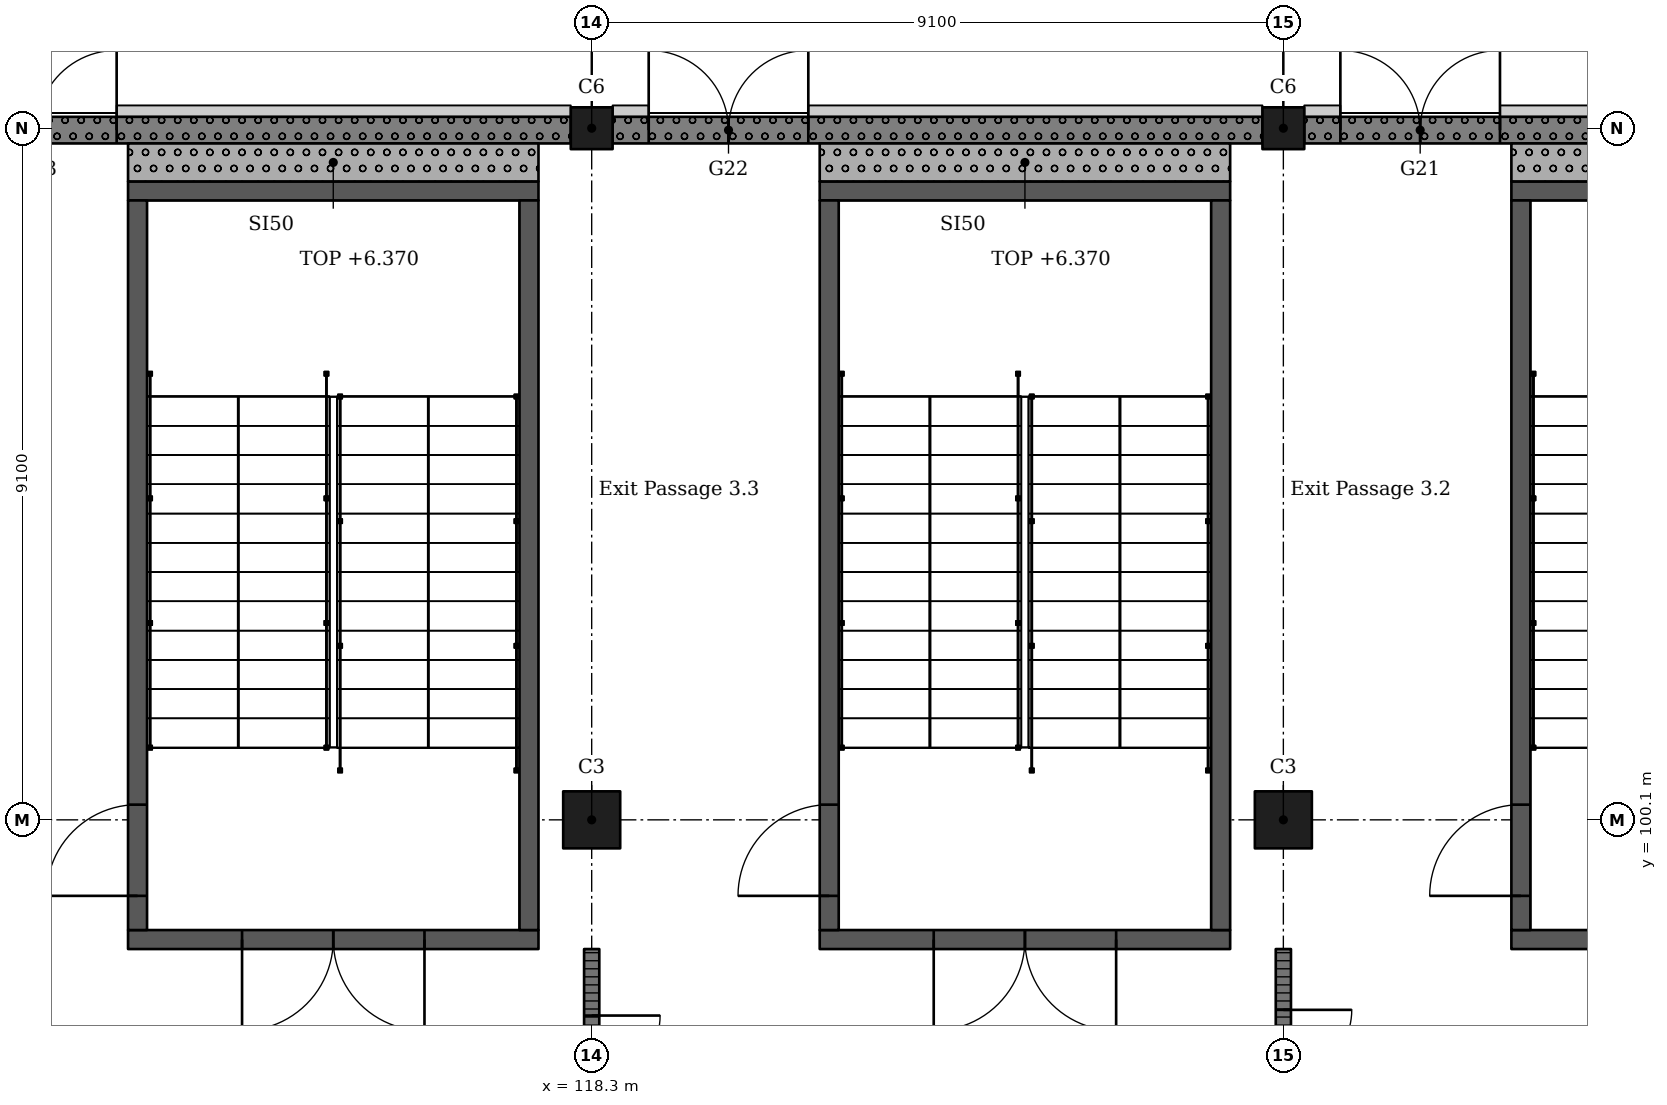
"""IFC4 building model, lengths in metres.
Left out: names, types, materials, properties, quantities, classifications, styles, units other than length and angle.
Written with IfcOpenShell. Run it as: python <this file> out.ifc"""

import sys

from ifc_helpers import new_model, si_unit, direction, frame, frame_2d, origin, origin_2d, place, context, subcontext, project, spatial, rectangle, extrude, element, fill, save


model = new_model("IFC4")
c1 = context("Model", 3, precision=1e-05, world=origin(), true_north=direction((0.0, 1.0)))
c2 = subcontext(c1, "Body", "Model", "MODEL_VIEW")
j1 = project(units=[si_unit("LENGTHUNIT", "METRE"), si_unit("PLANEANGLEUNIT", "RADIAN")], contexts=[c1])
p1 = place(None, origin())
s1 = spatial("IfcSite", under=j1, at=p1, CompositionType="ELEMENT")
p2 = place(p1, origin())
s2 = spatial("IfcBuilding", under=s1, at=p2, CompositionType="ELEMENT")
p3 = place(p2, origin())
s3 = spatial("IfcBuildingStorey", under=s2, at=p3, CompositionType="ELEMENT", Elevation=0.0)
p4 = place(p3, frame((118.3, 100.1, -0.4), z_axis=(0.0, 0.0, 1.0), x_axis=(1.0, 0.0, 0.0)))
e1 = element("IfcColumn", 1, at=p4, inside=s3, PredefinedType="COLUMN", context=c2, shape_type="SweptSolid", body=[
    extrude(rectangle(XDim=0.75, YDim=0.75, at=origin_2d()), origin(), (0.0, 0.0, 1.0), 6.77),
])
p5 = place(p3, frame((118.3, 109.2, -0.4), z_axis=(0.0, 0.0, 1.0), x_axis=(1.0, 0.0, 0.0)))
e2 = element("IfcColumn", 2, at=p5, inside=s3, PredefinedType="COLUMN", context=c2, shape_type="SweptSolid", body=[
    extrude(rectangle(XDim=0.55, YDim=0.55, at=origin_2d()), origin(), (0.0, 0.0, 1.0), 6.77),
])
p6 = place(p3, frame((127.4, 100.1, -0.4), z_axis=(0.0, 0.0, 1.0), x_axis=(1.0, 0.0, 0.0)))
e3 = element("IfcColumn", 3, at=p6, inside=s3, PredefinedType="COLUMN", context=c2, shape_type="SweptSolid", body=[
    extrude(rectangle(XDim=0.75, YDim=0.75, at=origin_2d()), origin(), (0.0, 0.0, 1.0), 6.77),
])
p7 = place(p3, frame((127.4, 109.2, -0.4), z_axis=(0.0, 0.0, 1.0), x_axis=(1.0, 0.0, 0.0)))
e4 = element("IfcColumn", 4, at=p7, inside=s3, PredefinedType="COLUMN", context=c2, shape_type="SweptSolid", body=[
    extrude(rectangle(XDim=0.55, YDim=0.55, at=origin_2d()), origin(), (0.0, 0.0, 1.0), 6.77),
])
p8 = place(p3, frame((135.8, 98.525, -0.4), z_axis=(0.0, 0.0, 1.0), x_axis=(-1.0, 0.0, 0.0)))
e5 = element("IfcWall", 5, at=p8, inside=s3, PredefinedType="SHEAR", context=c2, shape_type="SweptSolid", body=[
    extrude(rectangle(XDim=5.4, YDim=0.25, at=frame_2d((2.7, 0.0))), origin(), (0.0, 0.0, 1.0), 6.77),
])
p9 = place(p8, frame((1.5, 0.0, 0.4)))
e6 = element("IfcOpeningElement", 6, at=p9, cuts=e5, PredefinedType="OPENING", context=c2, shape_type="SweptSolid", body=[
    extrude(rectangle(XDim=2.4, YDim=2.1, at=frame_2d((1.2, 1.05))), frame((0.0, 0.135, 0.0), z_axis=(0.0, -1.0, 0.0), x_axis=(1.0, 0.0, 0.0)), (0.0, 0.0, 1.0), 0.27),
])
p10 = place(p3, frame((135.8, 108.375, -0.4), z_axis=(0.0, 0.0, 1.0), x_axis=(-1.0, 0.0, 0.0)))
e7 = element("IfcWall", 7, at=p10, inside=s3, PredefinedType="SHEAR", context=c2, shape_type="SweptSolid", body=[
    extrude(rectangle(XDim=5.4, YDim=0.25, at=frame_2d((2.7, 0.0))), origin(), (0.0, 0.0, 1.0), 6.77),
])
p11 = place(p3, frame((130.525, 108.25, -0.4), z_axis=(0.0, 0.0, 1.0), x_axis=(0.0, -1.0, 0.0)))
e8 = element("IfcWall", 8, at=p11, inside=s3, PredefinedType="SHEAR", context=c2, shape_type="SweptSolid", body=[
    extrude(rectangle(XDim=9.6, YDim=0.25, at=frame_2d((4.8, 0.0))), origin(), (0.0, 0.0, 1.0), 6.77),
])
p12 = place(p11, frame((7.95, 0.0, 0.4)))
e9 = element("IfcOpeningElement", 9, at=p12, cuts=e8, PredefinedType="OPENING", context=c2, shape_type="SweptSolid", body=[
    extrude(rectangle(XDim=1.2, YDim=2.1, at=frame_2d((0.6, 1.05))), frame((0.0, 0.135, 0.0), z_axis=(0.0, -1.0, 0.0), x_axis=(1.0, 0.0, 0.0)), (0.0, 0.0, 1.0), 0.27),
])
p13 = place(p3, frame((126.7, 98.525, -0.4), z_axis=(0.0, 0.0, 1.0), x_axis=(-1.0, 0.0, 0.0)))
e10 = element("IfcWall", 10, at=p13, inside=s3, PredefinedType="SHEAR", context=c2, shape_type="SweptSolid", body=[
    extrude(rectangle(XDim=5.4, YDim=0.25, at=frame_2d((2.7, 0.0))), origin(), (0.0, 0.0, 1.0), 6.77),
])
p14 = place(p13, frame((1.5, 0.0, 0.4)))
e11 = element("IfcOpeningElement", 11, at=p14, cuts=e10, PredefinedType="OPENING", context=c2, shape_type="SweptSolid", body=[
    extrude(rectangle(XDim=2.4, YDim=2.1, at=frame_2d((1.2, 1.05))), frame((0.0, 0.135, 0.0), z_axis=(0.0, -1.0, 0.0), x_axis=(1.0, 0.0, 0.0)), (0.0, 0.0, 1.0), 0.27),
])
p15 = place(p3, frame((126.7, 108.375, -0.4), z_axis=(0.0, 0.0, 1.0), x_axis=(-1.0, 0.0, 0.0)))
e12 = element("IfcWall", 12, at=p15, inside=s3, PredefinedType="SHEAR", context=c2, shape_type="SweptSolid", body=[
    extrude(rectangle(XDim=5.4, YDim=0.25, at=frame_2d((2.7, 0.0))), origin(), (0.0, 0.0, 1.0), 6.77),
])
p16 = place(p3, frame((121.425, 108.25, -0.4), z_axis=(0.0, 0.0, 1.0), x_axis=(0.0, -1.0, 0.0)))
e13 = element("IfcWall", 13, at=p16, inside=s3, PredefinedType="SHEAR", context=c2, shape_type="SweptSolid", body=[
    extrude(rectangle(XDim=9.6, YDim=0.25, at=frame_2d((4.8, 0.0))), origin(), (0.0, 0.0, 1.0), 6.77),
])
p17 = place(p16, frame((7.95, 0.0, 0.4)))
e14 = element("IfcOpeningElement", 14, at=p17, cuts=e13, PredefinedType="OPENING", context=c2, shape_type="SweptSolid", body=[
    extrude(rectangle(XDim=1.2, YDim=2.1, at=frame_2d((0.6, 1.05))), frame((0.0, 0.135, 0.0), z_axis=(0.0, -1.0, 0.0), x_axis=(1.0, 0.0, 0.0)), (0.0, 0.0, 1.0), 0.27),
])
p18 = place(p3, frame((126.575, 108.25, -0.4), z_axis=(0.0, 0.0, 1.0), x_axis=(0.0, -1.0, 0.0)))
e15 = element("IfcWall", 15, at=p18, inside=s3, PredefinedType="SHEAR", context=c2, shape_type="SweptSolid", body=[
    extrude(rectangle(XDim=9.6, YDim=0.25, at=frame_2d((4.8, 0.0))), origin(), (0.0, 0.0, 1.0), 6.77),
])
p19 = place(p3, frame((117.6, 98.525, -0.4), z_axis=(0.0, 0.0, 1.0), x_axis=(-1.0, 0.0, 0.0)))
e16 = element("IfcWall", 16, at=p19, inside=s3, PredefinedType="SHEAR", context=c2, shape_type="SweptSolid", body=[
    extrude(rectangle(XDim=5.4, YDim=0.25, at=frame_2d((2.7, 0.0))), origin(), (0.0, 0.0, 1.0), 6.77),
])
p20 = place(p19, frame((1.5, 0.0, 0.4)))
e17 = element("IfcOpeningElement", 17, at=p20, cuts=e16, PredefinedType="OPENING", context=c2, shape_type="SweptSolid", body=[
    extrude(rectangle(XDim=2.4, YDim=2.1, at=frame_2d((1.2, 1.05))), frame((0.0, 0.135, 0.0), z_axis=(0.0, -1.0, 0.0), x_axis=(1.0, 0.0, 0.0)), (0.0, 0.0, 1.0), 0.27),
])
p21 = place(p3, frame((117.6, 108.375, -0.4), z_axis=(0.0, 0.0, 1.0), x_axis=(-1.0, 0.0, 0.0)))
e18 = element("IfcWall", 18, at=p21, inside=s3, PredefinedType="SHEAR", context=c2, shape_type="SweptSolid", body=[
    extrude(rectangle(XDim=5.4, YDim=0.25, at=frame_2d((2.7, 0.0))), origin(), (0.0, 0.0, 1.0), 6.77),
])
p22 = place(p3, frame((112.325, 108.25, -0.4), z_axis=(0.0, 0.0, 1.0), x_axis=(0.0, -1.0, 0.0)))
e19 = element("IfcWall", 19, at=p22, inside=s3, PredefinedType="SHEAR", context=c2, shape_type="SweptSolid", body=[
    extrude(rectangle(XDim=9.6, YDim=0.25, at=frame_2d((4.8, 0.0))), origin(), (0.0, 0.0, 1.0), 6.77),
])
p23 = place(p22, frame((7.95, 0.0, 0.4)))
e20 = element("IfcOpeningElement", 20, at=p23, cuts=e19, PredefinedType="OPENING", context=c2, shape_type="SweptSolid", body=[
    extrude(rectangle(XDim=1.2, YDim=2.1, at=frame_2d((0.6, 1.05))), frame((0.0, 0.135, 0.0), z_axis=(0.0, -1.0, 0.0), x_axis=(1.0, 0.0, 0.0)), (0.0, 0.0, 1.0), 0.27),
])
p24 = place(p3, frame((117.475, 108.25, -0.4), z_axis=(0.0, 0.0, 1.0), x_axis=(0.0, -1.0, 0.0)))
e21 = element("IfcWall", 21, at=p24, inside=s3, PredefinedType="SHEAR", context=c2, shape_type="SweptSolid", body=[
    extrude(rectangle(XDim=9.6, YDim=0.25, at=frame_2d((4.8, 0.0))), origin(), (0.0, 0.0, 1.0), 6.77),
])
p25 = place(p3, frame((136.225, 109.175, 0.0), z_axis=(0.0, 0.0, 1.0), x_axis=(-1.0, 0.0, 0.0)))
e22 = element("IfcWall", 22, at=p25, inside=s3, PredefinedType="SOLIDWALL", context=c2, shape_type="SweptSolid", body=[
    extrude(rectangle(XDim=8.55, YDim=0.35, at=frame_2d((4.275, 0.0))), origin(), (0.0, 0.0, 1.0), 5.27),
])
p26 = place(p25, frame((5.975, 0.0, 0.0)))
e23 = element("IfcOpeningElement", 23, at=p26, cuts=e22, PredefinedType="OPENING", context=c2, shape_type="SweptSolid", body=[
    extrude(rectangle(XDim=2.1, YDim=2.4, at=frame_2d((1.05, 1.2))), frame((0.0, 0.185, 0.0), z_axis=(0.0, -1.0, 0.0), x_axis=(1.0, 0.0, 0.0)), (0.0, 0.0, 1.0), 0.37),
])
p27 = place(p3, frame((127.125, 109.175, 0.0), z_axis=(0.0, 0.0, 1.0), x_axis=(-1.0, 0.0, 0.0)))
e24 = element("IfcWall", 24, at=p27, inside=s3, PredefinedType="SOLIDWALL", context=c2, shape_type="SweptSolid", body=[
    extrude(rectangle(XDim=8.55, YDim=0.35, at=frame_2d((4.275, 0.0))), origin(), (0.0, 0.0, 1.0), 5.27),
])
p28 = place(p27, frame((5.975, 0.0, 0.0)))
e25 = element("IfcOpeningElement", 25, at=p28, cuts=e24, PredefinedType="OPENING", context=c2, shape_type="SweptSolid", body=[
    extrude(rectangle(XDim=2.1, YDim=2.4, at=frame_2d((1.05, 1.2))), frame((0.0, 0.185, 0.0), z_axis=(0.0, -1.0, 0.0), x_axis=(1.0, 0.0, 0.0)), (0.0, 0.0, 1.0), 0.37),
])
p29 = place(p3, frame((118.025, 109.175, 0.0), z_axis=(0.0, 0.0, 1.0), x_axis=(-1.0, 0.0, 0.0)))
e26 = element("IfcWall", 26, at=p29, inside=s3, PredefinedType="SOLIDWALL", context=c2, shape_type="SweptSolid", body=[
    extrude(rectangle(XDim=8.5, YDim=0.35, at=frame_2d((4.25, 0.0))), origin(), (0.0, 0.0, 1.0), 5.27),
])
p30 = place(p29, frame((5.975, 0.0, 0.0)))
e27 = element("IfcOpeningElement", 27, at=p30, cuts=e26, PredefinedType="OPENING", context=c2, shape_type="SweptSolid", body=[
    extrude(rectangle(XDim=2.1, YDim=2.4, at=frame_2d((1.05, 1.2))), frame((0.0, 0.185, 0.0), z_axis=(0.0, -1.0, 0.0), x_axis=(1.0, 0.0, 0.0)), (0.0, 0.0, 1.0), 0.37),
])
p31 = place(p3, frame((130.4, 108.75, 0.0), z_axis=(0.0, 0.0, 1.0), x_axis=(1.0, 0.0, 0.0)))
e28 = element("IfcWall", 28, at=p31, inside=s3, PredefinedType="SOLIDWALL", context=c2, shape_type="SweptSolid", body=[
    extrude(rectangle(XDim=5.4, YDim=0.5, at=frame_2d((2.7, 0.0))), origin(), (0.0, 0.0, 1.0), 6.37),
])
p32 = place(p3, frame((121.3, 108.75, 0.0), z_axis=(0.0, 0.0, 1.0), x_axis=(1.0, 0.0, 0.0)))
e29 = element("IfcWall", 29, at=p32, inside=s3, PredefinedType="SOLIDWALL", context=c2, shape_type="SweptSolid", body=[
    extrude(rectangle(XDim=5.4, YDim=0.5, at=frame_2d((2.7, 0.0))), origin(), (0.0, 0.0, 1.0), 6.37),
])
p33 = place(p3, frame((112.2, 108.75, 0.0), z_axis=(0.0, 0.0, 1.0), x_axis=(1.0, 0.0, 0.0)))
e30 = element("IfcWall", 30, at=p33, inside=s3, PredefinedType="SOLIDWALL", context=c2, shape_type="SweptSolid", body=[
    extrude(rectangle(XDim=5.4, YDim=0.5, at=frame_2d((2.7, 0.0))), origin(), (0.0, 0.0, 1.0), 6.37),
])
p34 = place(p3, frame((118.3, 91.475, 0.0), z_axis=(0.0, 0.0, 1.0), x_axis=(0.0, 1.0, 0.0)))
e31 = element("IfcWall", 31, at=p34, inside=s3, PredefinedType="PARTITIONING", context=c2, shape_type="SweptSolid", body=[
    extrude(rectangle(XDim=6.925, YDim=0.2, at=frame_2d((3.462, 0.0))), origin(), (0.0, 0.0, 1.0), 5.32),
])
p35 = place(p34, frame((0.85, 0.0, 0.0)))
e32 = element("IfcOpeningElement", 32, at=p35, cuts=e31, PredefinedType="OPENING", context=c2, shape_type="SweptSolid", body=[
    extrude(rectangle(XDim=1.8, YDim=2.4, at=frame_2d((0.9, 1.2))), frame((0.0, 0.11, 0.0), z_axis=(0.0, -1.0, 0.0), x_axis=(1.0, 0.0, 0.0)), (0.0, 0.0, 1.0), 0.22),
])
p36 = place(p34, frame((4.25, 0.0, 0.0)))
e33 = element("IfcOpeningElement", 33, at=p36, cuts=e31, PredefinedType="OPENING", context=c2, shape_type="SweptSolid", body=[
    extrude(rectangle(XDim=1.8, YDim=2.4, at=frame_2d((0.9, 1.2))), frame((0.0, 0.11, 0.0), z_axis=(0.0, -1.0, 0.0), x_axis=(1.0, 0.0, 0.0)), (0.0, 0.0, 1.0), 0.22),
])
p37 = place(p3, frame((127.4, 91.45, 0.0), z_axis=(0.0, 0.0, 1.0), x_axis=(0.0, 1.0, 0.0)))
e34 = element("IfcWall", 34, at=p37, inside=s3, PredefinedType="PARTITIONING", context=c2, shape_type="SweptSolid", body=[
    extrude(rectangle(XDim=6.95, YDim=0.2, at=frame_2d((3.475, 0.0))), origin(), (0.0, 0.0, 1.0), 5.32),
])
p38 = place(p37, frame((0.85, 0.0, 0.0)))
e35 = element("IfcOpeningElement", 35, at=p38, cuts=e34, PredefinedType="OPENING", context=c2, shape_type="SweptSolid", body=[
    extrude(rectangle(XDim=1.8, YDim=2.4, at=frame_2d((0.9, 1.2))), frame((0.0, 0.11, 0.0), z_axis=(0.0, -1.0, 0.0), x_axis=(1.0, 0.0, 0.0)), (0.0, 0.0, 1.0), 0.22),
])
p39 = place(p37, frame((4.35, 0.0, 0.0)))
e36 = element("IfcOpeningElement", 36, at=p39, cuts=e34, PredefinedType="OPENING", context=c2, shape_type="SweptSolid", body=[
    extrude(rectangle(XDim=1.8, YDim=2.4, at=frame_2d((0.9, 1.2))), frame((0.0, 0.11, 0.0), z_axis=(0.0, -1.0, 0.0), x_axis=(1.0, 0.0, 0.0)), (0.0, 0.0, 1.0), 0.22),
])
p40 = place(p26, frame((2.1, 0.0, 0.0), z_axis=(0.0, 0.0, 1.0), x_axis=(-1.0, 0.0, 0.0)))
e37 = element("IfcDoor", 37, at=p40, inside=s3, OperationType="DOUBLE_DOOR_SINGLE_SWING", PredefinedType="DOOR", context=c2, shape_type="SweptSolid", body=[
    extrude(rectangle(XDim=2.1, YDim=2.4, at=frame_2d((1.05, 1.2))), frame((0.0, 0.025, 0.0), z_axis=(0.0, -1.0, 0.0), x_axis=(1.0, 0.0, 0.0)), (0.0, 0.0, 1.0), 0.05),
])
fill(e23, e37)
p41 = place(p28, frame((2.1, 0.0, 0.0), z_axis=(0.0, 0.0, 1.0), x_axis=(-1.0, 0.0, 0.0)))
e38 = element("IfcDoor", 38, at=p41, inside=s3, OperationType="DOUBLE_DOOR_SINGLE_SWING", PredefinedType="DOOR", context=c2, shape_type="SweptSolid", body=[
    extrude(rectangle(XDim=2.1, YDim=2.4, at=frame_2d((1.05, 1.2))), frame((0.0, 0.025, 0.0), z_axis=(0.0, -1.0, 0.0), x_axis=(1.0, 0.0, 0.0)), (0.0, 0.0, 1.0), 0.05),
])
fill(e25, e38)
p42 = place(p30, frame((2.1, 0.0, 0.0), z_axis=(0.0, 0.0, 1.0), x_axis=(-1.0, 0.0, 0.0)))
e39 = element("IfcDoor", 39, at=p42, inside=s3, OperationType="DOUBLE_DOOR_SINGLE_SWING", PredefinedType="DOOR", context=c2, shape_type="SweptSolid", body=[
    extrude(rectangle(XDim=2.1, YDim=2.4, at=frame_2d((1.05, 1.2))), frame((0.0, 0.025, 0.0), z_axis=(0.0, -1.0, 0.0), x_axis=(1.0, 0.0, 0.0)), (0.0, 0.0, 1.0), 0.05),
])
fill(e27, e39)
p43 = place(p39, origin())
e40 = element("IfcDoor", 40, at=p43, inside=s3, OperationType="DOUBLE_DOOR_SINGLE_SWING", PredefinedType="DOOR", context=c2, shape_type="SweptSolid", body=[
    extrude(rectangle(XDim=1.8, YDim=2.4, at=frame_2d((0.9, 1.2))), frame((0.0, 0.025, 0.0), z_axis=(0.0, -1.0, 0.0), x_axis=(1.0, 0.0, 0.0)), (0.0, 0.0, 1.0), 0.05),
])
fill(e36, e40)
p44 = place(p36, origin())
e41 = element("IfcDoor", 41, at=p44, inside=s3, OperationType="DOUBLE_DOOR_SINGLE_SWING", PredefinedType="DOOR", context=c2, shape_type="SweptSolid", body=[
    extrude(rectangle(XDim=1.8, YDim=2.4, at=frame_2d((0.9, 1.2))), frame((0.0, 0.025, 0.0), z_axis=(0.0, -1.0, 0.0), x_axis=(1.0, 0.0, 0.0)), (0.0, 0.0, 1.0), 0.05),
])
fill(e33, e41)
p45 = place(p14, origin())
e42 = element("IfcDoor", 42, at=p45, inside=s3, OperationType="DOUBLE_DOOR_SINGLE_SWING", PredefinedType="DOOR", context=c2, shape_type="SweptSolid", body=[
    extrude(rectangle(XDim=2.4, YDim=2.1, at=frame_2d((1.2, 1.05))), frame((0.0, 0.025, 0.0), z_axis=(0.0, -1.0, 0.0), x_axis=(1.0, 0.0, 0.0)), (0.0, 0.0, 1.0), 0.05),
])
fill(e11, e42)
p46 = place(p20, origin())
e43 = element("IfcDoor", 43, at=p46, inside=s3, OperationType="DOUBLE_DOOR_SINGLE_SWING", PredefinedType="DOOR", context=c2, shape_type="SweptSolid", body=[
    extrude(rectangle(XDim=2.4, YDim=2.1, at=frame_2d((1.2, 1.05))), frame((0.0, 0.025, 0.0), z_axis=(0.0, -1.0, 0.0), x_axis=(1.0, 0.0, 0.0)), (0.0, 0.0, 1.0), 0.05),
])
fill(e17, e43)
p47 = place(p12, origin())
e44 = element("IfcDoor", 44, at=p47, inside=s3, OperationType="SINGLE_SWING_RIGHT", PredefinedType="DOOR", context=c2, shape_type="SweptSolid", body=[
    extrude(rectangle(XDim=1.2, YDim=2.1, at=frame_2d((0.6, 1.05))), frame((0.0, 0.025, 0.0), z_axis=(0.0, -1.0, 0.0), x_axis=(1.0, 0.0, 0.0)), (0.0, 0.0, 1.0), 0.05),
])
fill(e9, e44)
p48 = place(p17, origin())
e45 = element("IfcDoor", 45, at=p48, inside=s3, OperationType="SINGLE_SWING_RIGHT", PredefinedType="DOOR", context=c2, shape_type="SweptSolid", body=[
    extrude(rectangle(XDim=1.2, YDim=2.1, at=frame_2d((0.6, 1.05))), frame((0.0, 0.025, 0.0), z_axis=(0.0, -1.0, 0.0), x_axis=(1.0, 0.0, 0.0)), (0.0, 0.0, 1.0), 0.05),
])
fill(e14, e45)
p49 = place(p23, origin())
e46 = element("IfcDoor", 46, at=p49, inside=s3, OperationType="SINGLE_SWING_RIGHT", PredefinedType="DOOR", context=c2, shape_type="SweptSolid", body=[
    extrude(rectangle(XDim=1.2, YDim=2.1, at=frame_2d((0.6, 1.05))), frame((0.0, 0.025, 0.0), z_axis=(0.0, -1.0, 0.0), x_axis=(1.0, 0.0, 0.0)), (0.0, 0.0, 1.0), 0.05),
])
fill(e20, e46)
save(model, sys.argv[1])
